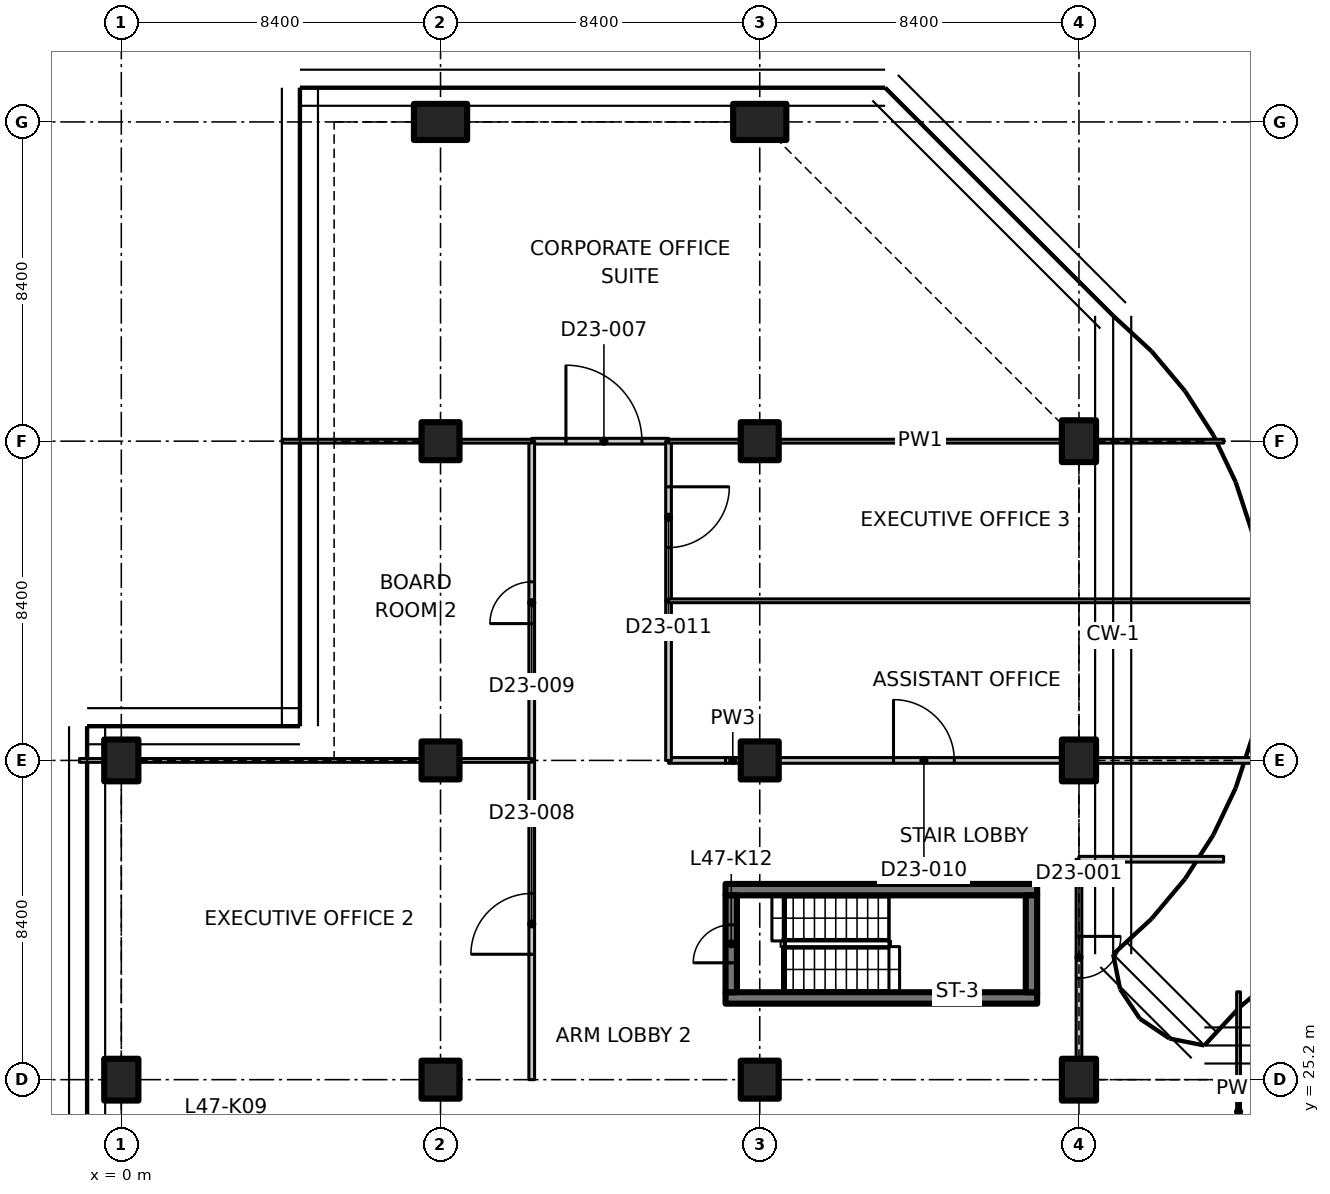
"""IFC4 building model, lengths in metres.
Left out: names, types, materials, properties, quantities, classifications, styles, units other than length and angle.
Written with IfcOpenShell. Run it as: python <this file> out.ifc"""

import sys

from ifc_helpers import new_model, si_unit, direction, frame, frame_2d, origin, origin_2d, place, context, subcontext, project, spatial, polyline, rectangle, outline, extrude, element, fill, save


model = new_model("IFC4")
c1 = context("Model", 3, precision=1e-05, world=origin(), true_north=direction((0.0, 1.0)))
c2 = subcontext(c1, "Body", "Model", "MODEL_VIEW")
j1 = project(units=[si_unit("LENGTHUNIT", "METRE"), si_unit("PLANEANGLEUNIT", "RADIAN")], contexts=[c1])
p1 = place(None, origin())
s1 = spatial("IfcSite", under=j1, at=p1, CompositionType="ELEMENT")
p2 = place(p1, origin())
s2 = spatial("IfcBuilding", under=s1, at=p2, CompositionType="ELEMENT")
p3 = place(p2, frame((0.0, 0.0, 188.4)))
s3 = spatial("IfcBuildingStorey", under=s2, at=p3, CompositionType="ELEMENT", Elevation=188.4)
for number, where, z_axis, x_axis in (
    (1, (0.0, 25.2, 0.0), (0.0, 0.0, 1.0), (1.0, 0.0, 0.0)),
    (2, (0.0, 33.6, 0.0), (0.0, 0.0, 1.0), (1.0, 0.0, 0.0)),
):
    element("IfcColumn", number, at=place(p3, frame(where, z_axis=z_axis, x_axis=x_axis)), inside=s3, PredefinedType="COLUMN", context=c2, shape_type="SweptSolid", body=[
        extrude(rectangle(XDim=0.9, YDim=1.1, at=origin_2d()), origin(), (0.0, 0.0, 1.0), 3.35),
    ])
for number, where, z_axis, x_axis in (
    (3, (8.4, 25.2, 0.0), (0.0, 0.0, 1.0), (1.0, 0.0, 0.0)),
    (4, (8.4, 33.6, 0.0), (0.0, 0.0, 1.0), (1.0, 0.0, 0.0)),
    (5, (8.4, 42.0, 0.0), (0.0, 0.0, 1.0), (1.0, 0.0, 0.0)),
):
    element("IfcColumn", number, at=place(p3, frame(where, z_axis=z_axis, x_axis=x_axis)), inside=s3, PredefinedType="COLUMN", context=c2, shape_type="SweptSolid", body=[
        extrude(rectangle(XDim=1.0, YDim=1.0, at=origin_2d()), origin(), (0.0, 0.0, 1.0), 3.35),
    ])
p4 = place(p3, frame((8.4, 50.4, 0.0), z_axis=(0.0, 0.0, 1.0), x_axis=(0.0, 1.0, 0.0)))
e6 = element("IfcColumn", 6, at=p4, inside=s3, PredefinedType="COLUMN", context=c2, shape_type="SweptSolid", body=[
    extrude(rectangle(XDim=0.95, YDim=1.4, at=origin_2d()), origin(), (0.0, 0.0, 1.0), 3.35),
])
for number, where, z_axis, x_axis in (
    (7, (16.8, 25.2, 0.0), (0.0, 0.0, 1.0), (1.0, 0.0, 0.0)),
    (8, (16.8, 33.6, 0.0), (0.0, 0.0, 1.0), (1.0, 0.0, 0.0)),
    (9, (16.8, 42.0, 0.0), (0.0, 0.0, 1.0), (1.0, 0.0, 0.0)),
):
    element("IfcColumn", number, at=place(p3, frame(where, z_axis=z_axis, x_axis=x_axis)), inside=s3, PredefinedType="COLUMN", context=c2, shape_type="SweptSolid", body=[
        extrude(rectangle(XDim=1.0, YDim=1.0, at=origin_2d()), origin(), (0.0, 0.0, 1.0), 3.35),
    ])
p5 = place(p3, frame((16.8, 50.4, 0.0), z_axis=(0.0, 0.0, 1.0), x_axis=(0.0, 1.0, 0.0)))
e10 = element("IfcColumn", 10, at=p5, inside=s3, PredefinedType="COLUMN", context=c2, shape_type="SweptSolid", body=[
    extrude(rectangle(XDim=0.95, YDim=1.4, at=origin_2d()), origin(), (0.0, 0.0, 1.0), 3.35),
])
for number, where, z_axis, x_axis in (
    (11, (25.2, 25.2, 0.0), (0.0, 0.0, 1.0), (1.0, 0.0, 0.0)),
    (12, (25.2, 33.6, 0.0), (0.0, 0.0, 1.0), (1.0, 0.0, 0.0)),
    (13, (25.2, 42.0, 0.0), (0.0, 0.0, 1.0), (1.0, 0.0, 0.0)),
):
    element("IfcColumn", number, at=place(p3, frame(where, z_axis=z_axis, x_axis=x_axis)), inside=s3, PredefinedType="COLUMN", context=c2, shape_type="SweptSolid", body=[
        extrude(rectangle(XDim=0.9, YDim=1.1, at=origin_2d()), origin(), (0.0, 0.0, 1.0), 3.35),
    ])
for number, where, z_axis, x_axis in (
    (14, (15.9, 27.35, 0.0), (0.0, 0.0, 1.0), (1.0, 0.0, 0.0)),
    (15, (15.9, 30.2, 0.0), (0.0, 0.0, 1.0), (1.0, 0.0, 0.0)),
):
    element("IfcWall", number, at=place(p3, frame(where, z_axis=z_axis, x_axis=x_axis)), inside=s3, PredefinedType="SHEAR", context=c2, shape_type="SweptSolid", body=[
        extrude(rectangle(XDim=8.2, YDim=0.3, at=frame_2d((4.1, 0.0))), origin(), (0.0, 0.0, 1.0), 3.35),
    ])
p6 = place(p3, frame((16.05, 27.5, 0.0), z_axis=(0.0, 0.0, 1.0), x_axis=(0.0, 1.0, 0.0)))
e16 = element("IfcWall", 16, at=p6, inside=s3, PredefinedType="SHEAR", context=c2, shape_type="SweptSolid", body=[
    extrude(rectangle(XDim=2.55, YDim=0.3, at=frame_2d((1.275, 0.0))), origin(), (0.0, 0.0, 1.0), 3.35),
])
p7 = place(p6, frame((0.775, 0.0, 0.0)))
e17 = element("IfcOpeningElement", 17, at=p7, cuts=e16, PredefinedType="OPENING", context=c2, shape_type="SweptSolid", body=[
    extrude(rectangle(XDim=1.0, YDim=2.1, at=frame_2d((0.5, 1.05))), frame((0.0, 0.16, 0.0), z_axis=(0.0, -1.0, 0.0), x_axis=(1.0, 0.0, 0.0)), (0.0, 0.0, 1.0), 0.32),
])
p8 = place(p3, frame((23.95, 27.5, 0.0), z_axis=(0.0, 0.0, 1.0), x_axis=(0.0, 1.0, 0.0)))
e18 = element("IfcWall", 18, at=p8, inside=s3, PredefinedType="SHEAR", context=c2, shape_type="SweptSolid", body=[
    extrude(rectangle(XDim=2.55, YDim=0.3, at=frame_2d((1.275, 0.0))), origin(), (0.0, 0.0, 1.0), 3.35),
])
p9 = place(p3, frame((29.4, 27.511, 0.0), z_axis=(0.0, 0.0, 1.0), x_axis=(0.0, -1.0, 0.0)))
e19 = element("IfcWall", 19, at=p9, inside=s3, PredefinedType="PARTITIONING", context=c2, shape_type="SweptSolid", body=[
    extrude(outline(polyline([(0.0, 0.0), (6.311, 0.0), (6.311, 3.33), (2.761, 3.33), (2.759, 2.98), (1.863, 2.98), (1.861, 3.33), (0.236, 3.33), (0.0, 3.33), (0.0, 0.0)])), frame((0.0, 0.05, 0.0), z_axis=(0.0, -1.0, 0.0), x_axis=(1.0, 0.0, 0.0)), (0.0, 0.0, 1.0), 0.1),
])
p10 = place(p3, frame((25.2, 31.0, 0.0), z_axis=(0.0, 0.0, 1.0), x_axis=(0.0, -1.0, 0.0)))
e20 = element("IfcWall", 20, at=p10, inside=s3, PredefinedType="PARTITIONING", context=c2, shape_type="SweptSolid", body=[
    extrude(outline(polyline([(0.0, 0.0), (5.23, 0.0), (5.23, 2.98), (0.0, 2.98), (0.0, 0.0)])), frame((0.0, 0.075, 0.0), z_axis=(0.0, -1.0, 0.0), x_axis=(1.0, 0.0, 0.0)), (0.0, 0.0, 1.0), 0.15),
])
p11 = place(p10, frame((2.03, 0.0, 0.0)))
e21 = element("IfcOpeningElement", 21, at=p11, cuts=e20, PredefinedType="OPENING", context=c2, shape_type="SweptSolid", body=[
    extrude(rectangle(XDim=1.1, YDim=2.1, at=frame_2d((0.55, 1.05))), frame((0.0, 0.085, 0.0), z_axis=(0.0, -1.0, 0.0), x_axis=(1.0, 0.0, 0.0)), (0.0, 0.0, 1.0), 0.17),
])
p12 = place(p3, frame((25.2, 31.0, 0.0), z_axis=(0.0, 0.0, 1.0), x_axis=(1.0, 0.0, 0.0)))
e22 = element("IfcWall", 22, at=p12, inside=s3, PredefinedType="PARTITIONING", context=c2, shape_type="SweptSolid", body=[
    extrude(rectangle(XDim=3.806, YDim=0.15, at=frame_2d((1.903, 0.0))), origin(), (0.0, 0.0, 1.0), 2.98),
])
p13 = place(p3, frame((10.8, 25.2, 0.0), z_axis=(0.0, 0.0, 1.0), x_axis=(0.0, 1.0, 0.0)))
e23 = element("IfcWall", 23, at=p13, inside=s3, PredefinedType="PARTITIONING", context=c2, shape_type="SweptSolid", body=[
    extrude(rectangle(XDim=8.4, YDim=0.15, at=frame_2d((4.2, 0.0))), origin(), (0.0, 0.0, 1.0), 3.33),
])
p14 = place(p13, frame((3.3, 0.0, 0.0)))
e24 = element("IfcOpeningElement", 24, at=p14, cuts=e23, PredefinedType="OPENING", context=c2, shape_type="SweptSolid", body=[
    extrude(rectangle(XDim=1.6, YDim=2.1, at=frame_2d((0.8, 1.05))), frame((0.0, 0.085, 0.0), z_axis=(0.0, -1.0, 0.0), x_axis=(1.0, 0.0, 0.0)), (0.0, 0.0, 1.0), 0.17),
])
p15 = place(p3, frame((14.4, 33.6, 0.0), z_axis=(0.0, 0.0, 1.0), x_axis=(1.0, 0.0, 0.0)))
e25 = element("IfcWall", 25, at=p15, inside=s3, PredefinedType="PARTITIONING", context=c2, shape_type="SweptSolid", body=[
    extrude(rectangle(XDim=1.5, YDim=0.15, at=frame_2d((0.75, 0.0))), origin(), (0.0, 0.0, 1.0), 3.33),
])
p16 = place(p3, frame((15.9, 33.6, 0.0), z_axis=(0.0, 0.0, 1.0), x_axis=(1.0, 0.0, 0.0)))
e26 = element("IfcWall", 26, at=p16, inside=s3, PredefinedType="PARTITIONING", context=c2, shape_type="SweptSolid", body=[
    extrude(rectangle(XDim=0.38, YDim=0.15, at=frame_2d((0.19, 0.0))), origin(), (0.0, 0.0, 1.0), 3.33),
])
p17 = place(p3, frame((17.32, 33.6, 0.0), z_axis=(0.0, 0.0, 1.0), x_axis=(1.0, 0.0, 0.0)))
e27 = element("IfcWall", 27, at=p17, inside=s3, PredefinedType="PARTITIONING", context=c2, shape_type="SweptSolid", body=[
    extrude(rectangle(XDim=7.41, YDim=0.15, at=frame_2d((3.705, 0.0))), origin(), (0.0, 0.0, 1.0), 3.33),
])
p18 = place(p17, frame((3.0, 0.0, 0.0)))
e28 = element("IfcOpeningElement", 28, at=p18, cuts=e27, PredefinedType="OPENING", context=c2, shape_type="SweptSolid", body=[
    extrude(rectangle(XDim=1.6, YDim=2.1, at=frame_2d((0.8, 1.05))), frame((0.0, 0.085, 0.0), z_axis=(0.0, -1.0, 0.0), x_axis=(1.0, 0.0, 0.0)), (0.0, 0.0, 1.0), 0.17),
])
p19 = place(p3, frame((25.67, 33.6, 0.0), z_axis=(0.0, 0.0, 1.0), x_axis=(1.0, 0.0, 0.0)))
e29 = element("IfcWall", 29, at=p19, inside=s3, PredefinedType="PARTITIONING", context=c2, shape_type="SweptSolid", body=[
    extrude(rectangle(XDim=4.318, YDim=0.15, at=frame_2d((2.159, 0.0))), origin(), (0.0, 0.0, 1.0), 2.98),
])
p20 = place(p3, frame((10.8, 42.0, 0.0), z_axis=(0.0, 0.0, 1.0), x_axis=(1.0, 0.0, 0.0)))
e30 = element("IfcWall", 30, at=p20, inside=s3, PredefinedType="PARTITIONING", context=c2, shape_type="SweptSolid", body=[
    extrude(rectangle(XDim=3.6, YDim=0.15, at=frame_2d((1.8, 0.0))), origin(), (0.0, 0.0, 1.0), 3.33),
])
p21 = place(p20, frame((0.9, 0.0, 0.0)))
e31 = element("IfcOpeningElement", 31, at=p21, cuts=e30, PredefinedType="OPENING", context=c2, shape_type="SweptSolid", body=[
    extrude(rectangle(XDim=2.0, YDim=2.4, at=frame_2d((1.0, 1.2))), frame((0.0, 0.085, 0.0), z_axis=(0.0, -1.0, 0.0), x_axis=(1.0, 0.0, 0.0)), (0.0, 0.0, 1.0), 0.17),
])
p22 = place(p3, frame((10.8, 33.6, 0.0), z_axis=(0.0, 0.0, 1.0), x_axis=(0.0, 1.0, 0.0)))
e32 = element("IfcWall", 32, at=p22, inside=s3, PredefinedType="PARTITIONING", context=c2, shape_type="SweptSolid", body=[
    extrude(rectangle(XDim=8.4, YDim=0.15, at=frame_2d((4.2, 0.0))), origin(), (0.0, 0.0, 1.0), 3.33),
])
p23 = place(p22, frame((3.6, 0.0, 0.0)))
e33 = element("IfcOpeningElement", 33, at=p23, cuts=e32, PredefinedType="OPENING", context=c2, shape_type="SweptSolid", body=[
    extrude(rectangle(XDim=1.1, YDim=2.1, at=frame_2d((0.55, 1.05))), frame((0.0, 0.085, 0.0), z_axis=(0.0, -1.0, 0.0), x_axis=(1.0, 0.0, 0.0)), (0.0, 0.0, 1.0), 0.17),
])
p24 = place(p3, frame((14.4, 37.8, 0.0), z_axis=(0.0, 0.0, 1.0), x_axis=(0.0, -1.0, 0.0)))
e34 = element("IfcWall", 34, at=p24, inside=s3, PredefinedType="PARTITIONING", context=c2, shape_type="SweptSolid", body=[
    extrude(rectangle(XDim=4.2, YDim=0.15, at=frame_2d((2.1, 0.0))), origin(), (0.0, 0.0, 1.0), 3.33),
])
p25 = place(p3, frame((14.4, 42.0, 0.0), z_axis=(0.0, 0.0, 1.0), x_axis=(0.0, -1.0, 0.0)))
e35 = element("IfcWall", 35, at=p25, inside=s3, PredefinedType="PARTITIONING", context=c2, shape_type="SweptSolid", body=[
    extrude(rectangle(XDim=4.2, YDim=0.15, at=frame_2d((2.1, 0.0))), origin(), (0.0, 0.0, 1.0), 3.33),
])
p26 = place(p25, frame((1.2, 0.0, 0.0)))
e36 = element("IfcOpeningElement", 36, at=p26, cuts=e35, PredefinedType="OPENING", context=c2, shape_type="SweptSolid", body=[
    extrude(rectangle(XDim=1.6, YDim=2.1, at=frame_2d((0.8, 1.05))), frame((0.0, 0.085, 0.0), z_axis=(0.0, -1.0, 0.0), x_axis=(1.0, 0.0, 0.0)), (0.0, 0.0, 1.0), 0.17),
])
p27 = place(p3, frame((10.8, 42.0, 0.0), z_axis=(0.0, 0.0, 1.0), x_axis=(-1.0, 0.0, 0.0)))
e37 = element("IfcWall", 37, at=p27, inside=s3, PredefinedType="PARTITIONING", context=c2, shape_type="SweptSolid", body=[
    extrude(rectangle(XDim=1.88, YDim=0.1, at=frame_2d((0.94, 0.0))), origin(), (0.0, 0.0, 1.0), 3.33),
])
p28 = place(p3, frame((7.88, 42.0, 0.0), z_axis=(0.0, 0.0, 1.0), x_axis=(-1.0, 0.0, 0.0)))
e38 = element("IfcWall", 38, at=p28, inside=s3, PredefinedType="PARTITIONING", context=c2, shape_type="SweptSolid", body=[
    extrude(rectangle(XDim=3.645, YDim=0.1, at=frame_2d((1.822, 0.0))), origin(), (0.0, 0.0, 1.0), 2.98),
])
p29 = place(p3, frame((29.011, 42.0, 0.0), z_axis=(0.0, 0.0, 1.0), x_axis=(-1.0, 0.0, 0.0)))
e39 = element("IfcWall", 39, at=p29, inside=s3, PredefinedType="PARTITIONING", context=c2, shape_type="SweptSolid", body=[
    extrude(rectangle(XDim=3.342, YDim=0.1, at=frame_2d((1.671, 0.0))), origin(), (0.0, 0.0, 1.0), 2.98),
])
p30 = place(p3, frame((24.73, 42.0, 0.0), z_axis=(0.0, 0.0, 1.0), x_axis=(-1.0, 0.0, 0.0)))
e40 = element("IfcWall", 40, at=p30, inside=s3, PredefinedType="PARTITIONING", context=c2, shape_type="SweptSolid", body=[
    extrude(outline(polyline([(0.0, 0.0), (7.41, 0.0), (7.41, 3.33), (0.196, 3.33), (0.194, 2.98), (0.0, 2.98), (0.0, 0.0)])), frame((0.0, 0.05, 0.0), z_axis=(0.0, -1.0, 0.0), x_axis=(1.0, 0.0, 0.0)), (0.0, 0.0, 1.0), 0.1),
])
p31 = place(p3, frame((16.28, 42.0, 0.0), z_axis=(0.0, 0.0, 1.0), x_axis=(-1.0, 0.0, 0.0)))
e41 = element("IfcWall", 41, at=p31, inside=s3, PredefinedType="PARTITIONING", context=c2, shape_type="SweptSolid", body=[
    extrude(rectangle(XDim=1.88, YDim=0.1, at=frame_2d((0.94, 0.0))), origin(), (0.0, 0.0, 1.0), 3.33),
])
p32 = place(p3, frame((-1.1, 33.6, 0.0), z_axis=(0.0, 0.0, 1.0), x_axis=(1.0, 0.0, 0.0)))
e42 = element("IfcWall", 42, at=p32, inside=s3, PredefinedType="PARTITIONING", context=c2, shape_type="SweptSolid", body=[
    extrude(rectangle(XDim=0.63, YDim=0.1, at=frame_2d((0.315, 0.0))), origin(), (0.0, 0.0, 1.0), 3.33),
])
p33 = place(p3, frame((0.47, 33.6, 0.0), z_axis=(0.0, 0.0, 1.0), x_axis=(1.0, 0.0, 0.0)))
e43 = element("IfcWall", 43, at=p33, inside=s3, PredefinedType="PARTITIONING", context=c2, shape_type="SweptSolid", body=[
    extrude(outline(polyline([(0.0, 0.0), (7.41, 0.0), (7.41, 2.98), (0.0, 2.98), (0.0, 0.0)])), frame((0.0, 0.05, 0.0), z_axis=(0.0, -1.0, 0.0), x_axis=(1.0, 0.0, 0.0)), (0.0, 0.0, 1.0), 0.1),
])
p34 = place(p3, frame((8.92, 33.6, 0.0), z_axis=(0.0, 0.0, 1.0), x_axis=(1.0, 0.0, 0.0)))
e44 = element("IfcWall", 44, at=p34, inside=s3, PredefinedType="PARTITIONING", context=c2, shape_type="SweptSolid", body=[
    extrude(rectangle(XDim=1.88, YDim=0.1, at=frame_2d((0.94, 0.0))), origin(), (0.0, 0.0, 1.0), 3.33),
])
p35 = place(p3, frame((14.4, 37.8, 0.0), z_axis=(0.0, 0.0, 1.0), x_axis=(1.0, 0.0, 0.0)))
e45 = element("IfcWall", 45, at=p35, inside=s3, PredefinedType="PARTITIONING", context=c2, shape_type="SweptSolid", body=[
    extrude(outline(polyline([(0.0, 0.0), (16.126, 0.0), (16.126, 3.33), (15.843, 3.33), (11.25, 3.33), (11.248, 2.98), (10.352, 2.98), (10.35, 3.33), (0.0, 3.33), (0.0, 0.0)])), frame((0.0, 0.05, 0.0), z_axis=(0.0, -1.0, 0.0), x_axis=(1.0, 0.0, 0.0)), (0.0, 0.0, 1.0), 0.1),
])
p36 = place(p7, origin())
e46 = element("IfcDoor", 46, at=p36, inside=s3, OperationType="SINGLE_SWING_RIGHT", PredefinedType="DOOR", context=c2, shape_type="SweptSolid", body=[
    extrude(rectangle(XDim=1.0, YDim=2.1, at=frame_2d((0.5, 1.05))), frame((0.0, 0.025, 0.0), z_axis=(0.0, -1.0, 0.0), x_axis=(1.0, 0.0, 0.0)), (0.0, 0.0, 1.0), 0.05),
])
fill(e17, e46)
p37 = place(p11, origin())
e47 = element("IfcDoor", 47, at=p37, inside=s3, OperationType="SINGLE_SWING_RIGHT", PredefinedType="DOOR", context=c2, shape_type="SweptSolid", body=[
    extrude(rectangle(XDim=1.1, YDim=2.1, at=frame_2d((0.55, 1.05))), frame((0.0, 0.025, 0.0), z_axis=(0.0, -1.0, 0.0), x_axis=(1.0, 0.0, 0.0)), (0.0, 0.0, 1.0), 0.05),
])
fill(e21, e47)
p38 = place(p21, origin())
e48 = element("IfcDoor", 48, at=p38, inside=s3, OperationType="DOUBLE_DOOR_SINGLE_SWING", PredefinedType="DOOR", context=c2, shape_type="SweptSolid", body=[
    extrude(rectangle(XDim=2.0, YDim=2.4, at=frame_2d((1.0, 1.2))), frame((0.0, 0.025, 0.0), z_axis=(0.0, -1.0, 0.0), x_axis=(1.0, 0.0, 0.0)), (0.0, 0.0, 1.0), 0.05),
])
fill(e31, e48)
p39 = place(p14, origin())
e49 = element("IfcDoor", 49, at=p39, inside=s3, OperationType="DOUBLE_DOOR_SINGLE_SWING", PredefinedType="DOOR", context=c2, shape_type="SweptSolid", body=[
    extrude(rectangle(XDim=1.6, YDim=2.1, at=frame_2d((0.8, 1.05))), frame((0.0, 0.025, 0.0), z_axis=(0.0, -1.0, 0.0), x_axis=(1.0, 0.0, 0.0)), (0.0, 0.0, 1.0), 0.05),
])
fill(e24, e49)
p40 = place(p23, origin())
e50 = element("IfcDoor", 50, at=p40, inside=s3, OperationType="SINGLE_SWING_LEFT", PredefinedType="DOOR", context=c2, shape_type="SweptSolid", body=[
    extrude(rectangle(XDim=1.1, YDim=2.1, at=frame_2d((0.55, 1.05))), frame((0.0, 0.025, 0.0), z_axis=(0.0, -1.0, 0.0), x_axis=(1.0, 0.0, 0.0)), (0.0, 0.0, 1.0), 0.05),
])
fill(e33, e50)
p41 = place(p18, origin())
e51 = element("IfcDoor", 51, at=p41, inside=s3, OperationType="DOUBLE_DOOR_SINGLE_SWING", PredefinedType="DOOR", context=c2, shape_type="SweptSolid", body=[
    extrude(rectangle(XDim=1.6, YDim=2.1, at=frame_2d((0.8, 1.05))), frame((0.0, 0.025, 0.0), z_axis=(0.0, -1.0, 0.0), x_axis=(1.0, 0.0, 0.0)), (0.0, 0.0, 1.0), 0.05),
])
fill(e28, e51)
p42 = place(p26, origin())
e52 = element("IfcDoor", 52, at=p42, inside=s3, OperationType="DOUBLE_DOOR_SINGLE_SWING", PredefinedType="DOOR", context=c2, shape_type="SweptSolid", body=[
    extrude(rectangle(XDim=1.6, YDim=2.1, at=frame_2d((0.8, 1.05))), frame((0.0, 0.025, 0.0), z_axis=(0.0, -1.0, 0.0), x_axis=(1.0, 0.0, 0.0)), (0.0, 0.0, 1.0), 0.05),
])
fill(e36, e52)
save(model, sys.argv[1])
